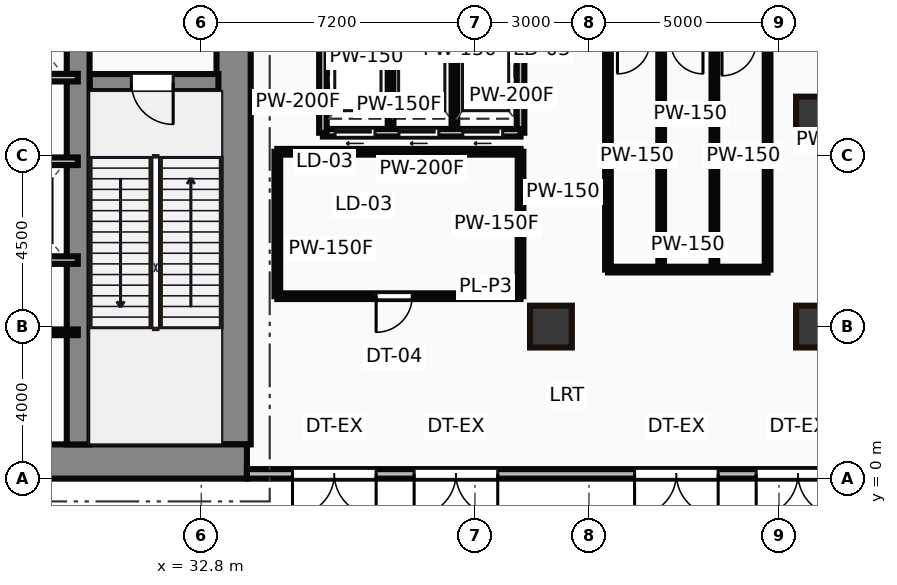
"""IFC4 building model, lengths in metres.
Left out: names, types, materials, properties, quantities, classifications, styles, units other than length and angle.
Written with IfcOpenShell. Run it as: python <this file> out.ifc"""

import sys

from ifc_helpers import new_model, si_unit, direction, frame, frame_2d, origin, origin_2d, place, context, subcontext, project, spatial, rectangle, hollow_rectangle, extrude, source, transform, mapped, element, fill, save


model = new_model("IFC4")
c1 = context("Model", 3, precision=1e-05, world=origin(), true_north=direction((0.0, 1.0)))
c2 = subcontext(c1, "Body", "Model", "MODEL_VIEW")
j1 = project(units=[si_unit("LENGTHUNIT", "METRE"), si_unit("PLANEANGLEUNIT", "RADIAN")], contexts=[c1])
p1 = place(None, origin())
s1 = spatial("IfcSite", under=j1, at=p1, CompositionType="ELEMENT")
p2 = place(p1, origin())
s2 = spatial("IfcBuilding", under=s1, at=p2, CompositionType="ELEMENT")
p3 = place(p2, origin())
s3 = spatial("IfcBuildingStorey", under=s2, at=p3, CompositionType="ELEMENT", Elevation=0.0)
m1 = source(origin(), c2, "Body", "SweptSolid", [
    extrude(rectangle(XDim=29.5, YDim=0.9, at=frame_2d((14.75, 0.0))), origin(), (0.0, 0.0, 1.0), 6.0),
])
p4 = place(p3, frame((4.5, 0.45, 0.0), z_axis=(0.0, 0.0, 1.0), x_axis=(1.0, 0.0, 0.0)))
e1 = element("IfcWall", 1, at=p4, inside=s3, PredefinedType="SHEAR", context=c2, shape_type="MappedRepresentation", body=[
    mapped(m1, transform((0.0, 0.0, 0.0))),
])
m2 = source(origin(), c2, "Body", "SweptSolid", [
    extrude(rectangle(XDim=13.1, YDim=0.9, at=frame_2d((6.55, 0.0))), origin(), (0.0, 0.0, 1.0), 6.0),
])
p5 = place(p3, frame((33.65, 0.9, 0.0), z_axis=(0.0, 0.0, 1.0), x_axis=(0.0, 1.0, 0.0)))
e2 = element("IfcWall", 2, at=p5, inside=s3, PredefinedType="SHEAR", context=c2, shape_type="MappedRepresentation", body=[
    mapped(m2, transform((0.0, 0.0, 0.0))),
])
m3 = source(origin(), c2, "Body", "SweptSolid", [
    extrude(rectangle(XDim=12.2, YDim=0.6, at=frame_2d((6.1, 0.0))), origin(), (0.0, 0.0, 1.0), 6.0),
])
p6 = place(p3, frame((29.56, 0.9, 0.0), z_axis=(0.0, 0.0, 1.0), x_axis=(0.0, 1.0, 0.0)))
e3 = element("IfcWall", 3, at=p6, inside=s3, PredefinedType="SHEAR", context=c2, shape_type="MappedRepresentation", body=[
    mapped(m3, transform((0.0, 0.0, 0.0))),
])
m4 = source(origin(), c2, "Body", "SweptSolid", [
    extrude(rectangle(XDim=3.39, YDim=0.45, at=frame_2d((1.695, 0.0))), origin(), (0.0, 0.0, 1.0), 6.0),
])
p7 = place(p3, frame((29.86, 10.42, 0.0), z_axis=(0.0, 0.0, 1.0), x_axis=(1.0, 0.0, 0.0)))
e4 = element("IfcWall", 4, at=p7, inside=s3, PredefinedType="SHEAR", context=c2, shape_type="MappedRepresentation", body=[
    mapped(m4, transform((0.0, 0.0, 0.0))),
])
p8 = place(p7, frame((1.1, 0.0, 0.0)))
e5 = element("IfcOpeningElement", 5, at=p8, cuts=e4, PredefinedType="OPENING", context=c2, shape_type="SweptSolid", body=[
    extrude(rectangle(XDim=1.1, YDim=2.15, at=frame_2d((0.55, 1.075))), frame((0.0, 0.235, 0.0), z_axis=(0.0, -1.0, 0.0), x_axis=(1.0, 0.0, 0.0)), (0.0, 0.0, 1.0), 0.47),
])
m5 = source(origin(), c2, "Body", "SweptSolid", [
    extrude(hollow_rectangle(XDim=1.1, YDim=1.1, WallThickness=0.05, at=origin_2d()), origin(), (0.0, 0.0, 1.0), 6.0),
])
for number, where, z_axis, x_axis in (
    (6, (49.0, 9.5, 0.0), (0.0, 0.0, 1.0), (1.0, 0.0, 0.0)),
    (7, (42.0, 4.0, 0.0), (0.0, 0.0, 1.0), (1.0, 0.0, 0.0)),
    (8, (49.0, 4.0, 0.0), (0.0, 0.0, 1.0), (1.0, 0.0, 0.0)),
):
    element("IfcColumn", number, at=place(p3, frame(where, z_axis=z_axis, x_axis=x_axis)), inside=s3, PredefinedType="PILASTER", context=c2, shape_type="MappedRepresentation", body=[
        mapped(m5, transform((0.0, 0.0, 0.0))),
    ])
m6 = source(origin(), c2, "Body", "SweptSolid", [
    extrude(rectangle(XDim=48.0, YDim=0.25, at=frame_2d((24.0, 0.0))), origin(), (0.0, 0.0, 1.0), 5.7),
])
p9 = place(p3, frame((34.0, 0.125, 0.0), z_axis=(0.0, 0.0, 1.0), x_axis=(1.0, 0.0, 0.0)))
e9 = element("IfcWall", 9, at=p9, inside=s3, PredefinedType="STANDARD", context=c2, shape_type="MappedRepresentation", body=[
    mapped(m6, transform((0.0, 0.0, 0.0))),
])
p10 = place(p9, frame((1.2, 0.0, 0.0)))
e10 = element("IfcOpeningElement", 10, at=p10, cuts=e9, PredefinedType="OPENING", context=c2, shape_type="SweptSolid", body=[
    extrude(rectangle(XDim=2.2, YDim=2.4, at=frame_2d((1.1, 1.2))), frame((0.0, 0.135, 0.0), z_axis=(0.0, -1.0, 0.0), x_axis=(1.0, 0.0, 0.0)), (0.0, 0.0, 1.0), 0.27),
])
p11 = place(p9, frame((4.4, 0.0, 0.0)))
e11 = element("IfcOpeningElement", 11, at=p11, cuts=e9, PredefinedType="OPENING", context=c2, shape_type="SweptSolid", body=[
    extrude(rectangle(XDim=2.2, YDim=2.4, at=frame_2d((1.1, 1.2))), frame((0.0, 0.135, 0.0), z_axis=(0.0, -1.0, 0.0), x_axis=(1.0, 0.0, 0.0)), (0.0, 0.0, 1.0), 0.27),
])
p12 = place(p9, frame((10.2, 0.0, 0.0)))
e12 = element("IfcOpeningElement", 12, at=p12, cuts=e9, PredefinedType="OPENING", context=c2, shape_type="SweptSolid", body=[
    extrude(rectangle(XDim=2.2, YDim=2.4, at=frame_2d((1.1, 1.2))), frame((0.0, 0.135, 0.0), z_axis=(0.0, -1.0, 0.0), x_axis=(1.0, 0.0, 0.0)), (0.0, 0.0, 1.0), 0.27),
])
p13 = place(p9, frame((13.4, 0.0, 0.0)))
e13 = element("IfcOpeningElement", 13, at=p13, cuts=e9, PredefinedType="OPENING", context=c2, shape_type="SweptSolid", body=[
    extrude(rectangle(XDim=2.2, YDim=2.4, at=frame_2d((1.1, 1.2))), frame((0.0, 0.135, 0.0), z_axis=(0.0, -1.0, 0.0), x_axis=(1.0, 0.0, 0.0)), (0.0, 0.0, 1.0), 0.27),
])
p14 = place(p9, frame((17.8, 0.0, 0.0)))
e14 = element("IfcOpeningElement", 14, at=p14, cuts=e9, PredefinedType="OPENING", context=c2, shape_type="SweptSolid", body=[
    extrude(rectangle(XDim=2.2, YDim=2.4, at=frame_2d((1.1, 1.2))), frame((0.0, 0.135, 0.0), z_axis=(0.0, -1.0, 0.0), x_axis=(1.0, 0.0, 0.0)), (0.0, 0.0, 1.0), 0.27),
])
p15 = place(p9, frame((21.0, 0.0, 0.0)))
e15 = element("IfcOpeningElement", 15, at=p15, cuts=e9, PredefinedType="OPENING", context=c2, shape_type="SweptSolid", body=[
    extrude(rectangle(XDim=2.2, YDim=2.4, at=frame_2d((1.1, 1.2))), frame((0.0, 0.135, 0.0), z_axis=(0.0, -1.0, 0.0), x_axis=(1.0, 0.0, 0.0)), (0.0, 0.0, 1.0), 0.27),
])
p16 = place(p9, frame((23.6, 0.0, 0.0)))
e16 = element("IfcOpeningElement", 16, at=p16, cuts=e9, PredefinedType="OPENING", context=c2, shape_type="SweptSolid", body=[
    extrude(rectangle(XDim=2.2, YDim=2.4, at=frame_2d((1.1, 1.2))), frame((0.0, 0.135, 0.0), z_axis=(0.0, -1.0, 0.0), x_axis=(1.0, 0.0, 0.0)), (0.0, 0.0, 1.0), 0.27),
])
p17 = place(p9, frame((27.9, 0.0, 0.0)))
e17 = element("IfcOpeningElement", 17, at=p17, cuts=e9, PredefinedType="OPENING", context=c2, shape_type="SweptSolid", body=[
    extrude(rectangle(XDim=2.2, YDim=2.4, at=frame_2d((1.1, 1.2))), frame((0.0, 0.135, 0.0), z_axis=(0.0, -1.0, 0.0), x_axis=(1.0, 0.0, 0.0)), (0.0, 0.0, 1.0), 0.27),
])
p18 = place(p9, frame((32.9, 0.0, 0.0)))
e18 = element("IfcOpeningElement", 18, at=p18, cuts=e9, PredefinedType="OPENING", context=c2, shape_type="SweptSolid", body=[
    extrude(rectangle(XDim=2.2, YDim=2.4, at=frame_2d((1.1, 1.2))), frame((0.0, 0.135, 0.0), z_axis=(0.0, -1.0, 0.0), x_axis=(1.0, 0.0, 0.0)), (0.0, 0.0, 1.0), 0.27),
])
p19 = place(p9, frame((37.9, 0.0, 0.0)))
e19 = element("IfcOpeningElement", 19, at=p19, cuts=e9, PredefinedType="OPENING", context=c2, shape_type="SweptSolid", body=[
    extrude(rectangle(XDim=2.2, YDim=2.4, at=frame_2d((1.1, 1.2))), frame((0.0, 0.135, 0.0), z_axis=(0.0, -1.0, 0.0), x_axis=(1.0, 0.0, 0.0)), (0.0, 0.0, 1.0), 0.27),
])
p20 = place(p9, frame((44.2, 0.0, 0.0)))
e20 = element("IfcOpeningElement", 20, at=p20, cuts=e9, PredefinedType="OPENING", context=c2, shape_type="SweptSolid", body=[
    extrude(rectangle(XDim=2.2, YDim=2.4, at=frame_2d((1.1, 1.2))), frame((0.0, 0.135, 0.0), z_axis=(0.0, -1.0, 0.0), x_axis=(1.0, 0.0, 0.0)), (0.0, 0.0, 1.0), 0.27),
])
p21 = place(p9, frame((40.6, 0.0, 0.9)))
e21 = element("IfcOpeningElement", 21, at=p21, cuts=e9, PredefinedType="OPENING", context=c2, shape_type="SweptSolid", body=[
    extrude(rectangle(XDim=3.0, YDim=2.4, at=frame_2d((1.5, 1.2))), frame((0.0, 0.135, 0.0), z_axis=(0.0, -1.0, 0.0), x_axis=(1.0, 0.0, 0.0)), (0.0, 0.0, 1.0), 0.27),
])
m7 = source(origin(), c2, "Body", "SweptSolid", [
    extrude(rectangle(XDim=8.8, YDim=0.2, at=frame_2d((4.4, 0.0))), origin(), (0.0, 0.0, 1.0), 5.7),
])
p22 = place(p3, frame((20.75, 10.55, 0.0), z_axis=(0.0, 0.0, 1.0), x_axis=(1.0, 0.0, 0.0)))
e22 = element("IfcWall", 22, at=p22, inside=s3, PredefinedType="PARTITIONING", context=c2, shape_type="MappedRepresentation", body=[
    mapped(m7, transform((0.0, 0.0, 0.0))),
])
p23 = place(p22, frame((0.5, 0.0, 0.0)))
e23 = element("IfcOpeningElement", 23, at=p23, cuts=e22, PredefinedType="OPENING", context=c2, shape_type="SweptSolid", body=[
    extrude(rectangle(XDim=1.05, YDim=2.15, at=frame_2d((0.525, 1.075))), frame((0.0, 0.11, 0.0), z_axis=(0.0, -1.0, 0.0), x_axis=(1.0, 0.0, 0.0)), (0.0, 0.0, 1.0), 0.22),
])
p24 = place(p22, frame((2.6, 0.0, 0.0)))
e24 = element("IfcOpeningElement", 24, at=p24, cuts=e22, PredefinedType="OPENING", context=c2, shape_type="SweptSolid", body=[
    extrude(rectangle(XDim=1.05, YDim=2.15, at=frame_2d((0.525, 1.075))), frame((0.0, 0.11, 0.0), z_axis=(0.0, -1.0, 0.0), x_axis=(1.0, 0.0, 0.0)), (0.0, 0.0, 1.0), 0.22),
])
p25 = place(p22, frame((4.7, 0.0, 0.0)))
e25 = element("IfcOpeningElement", 25, at=p25, cuts=e22, PredefinedType="OPENING", context=c2, shape_type="SweptSolid", body=[
    extrude(rectangle(XDim=1.05, YDim=2.15, at=frame_2d((0.525, 1.075))), frame((0.0, 0.11, 0.0), z_axis=(0.0, -1.0, 0.0), x_axis=(1.0, 0.0, 0.0)), (0.0, 0.0, 1.0), 0.22),
])
p26 = place(p22, frame((6.8, 0.0, 0.0)))
e26 = element("IfcOpeningElement", 26, at=p26, cuts=e22, PredefinedType="OPENING", context=c2, shape_type="SweptSolid", body=[
    extrude(rectangle(XDim=1.05, YDim=2.15, at=frame_2d((0.525, 1.075))), frame((0.0, 0.11, 0.0), z_axis=(0.0, -1.0, 0.0), x_axis=(1.0, 0.0, 0.0)), (0.0, 0.0, 1.0), 0.22),
])
m8 = source(origin(), c2, "Body", "SweptSolid", [
    extrude(rectangle(XDim=4.55, YDim=0.2, at=frame_2d((2.275, 0.0))), origin(), (0.0, 0.0, 1.0), 5.7),
])
p27 = place(p3, frame((25.0, 8.35, 0.0), z_axis=(0.0, 0.0, 1.0), x_axis=(1.0, 0.0, 0.0)))
e27 = element("IfcWall", 27, at=p27, inside=s3, PredefinedType="PARTITIONING", context=c2, shape_type="MappedRepresentation", body=[
    mapped(m8, transform((0.0, 0.0, 0.0))),
])
p28 = place(p27, frame((0.5, 0.0, 0.0)))
e28 = element("IfcOpeningElement", 28, at=p28, cuts=e27, PredefinedType="OPENING", context=c2, shape_type="SweptSolid", body=[
    extrude(rectangle(XDim=1.05, YDim=2.15, at=frame_2d((0.525, 1.075))), frame((0.0, 0.11, 0.0), z_axis=(0.0, -1.0, 0.0), x_axis=(1.0, 0.0, 0.0)), (0.0, 0.0, 1.0), 0.22),
])
p29 = place(p27, frame((2.6, 0.0, 0.0)))
e29 = element("IfcOpeningElement", 29, at=p29, cuts=e27, PredefinedType="OPENING", context=c2, shape_type="SweptSolid", body=[
    extrude(rectangle(XDim=1.05, YDim=2.15, at=frame_2d((0.525, 1.075))), frame((0.0, 0.11, 0.0), z_axis=(0.0, -1.0, 0.0), x_axis=(1.0, 0.0, 0.0)), (0.0, 0.0, 1.0), 0.22),
])
p30 = place(p3, frame((25.0, 5.75, 0.0), z_axis=(0.0, 0.0, 1.0), x_axis=(1.0, 0.0, 0.0)))
e30 = element("IfcWall", 30, at=p30, inside=s3, PredefinedType="PARTITIONING", context=c2, shape_type="MappedRepresentation", body=[
    mapped(m8, transform((0.0, 0.0, 0.0))),
])
m9 = source(origin(), c2, "Body", "SweptSolid", [
    extrude(rectangle(XDim=4.55, YDim=0.15, at=frame_2d((2.275, 0.0))), origin(), (0.0, 0.0, 1.0), 5.7),
])
p31 = place(p3, frame((25.0, 3.85, 0.0), z_axis=(0.0, 0.0, 1.0), x_axis=(1.0, 0.0, 0.0)))
e31 = element("IfcWall", 31, at=p31, inside=s3, PredefinedType="PARTITIONING", context=c2, shape_type="MappedRepresentation", body=[
    mapped(m9, transform((0.0, 0.0, 0.0))),
])
m10 = source(origin(), c2, "Body", "SweptSolid", [
    extrude(rectangle(XDim=5.2, YDim=0.2, at=frame_2d((2.6, 0.0))), origin(), (0.0, 0.0, 1.0), 5.7),
])
p32 = place(p3, frame((36.0, 9.1, 0.0), z_axis=(0.0, 0.0, 1.0), x_axis=(1.0, 0.0, 0.0)))
e32 = element("IfcWall", 32, at=p32, inside=s3, PredefinedType="PARTITIONING", context=c2, shape_type="MappedRepresentation", body=[
    mapped(m10, transform((0.0, 0.0, 0.0))),
])
p33 = place(p32, frame((0.32, 0.0, 0.0)))
e33 = element("IfcOpeningElement", 33, at=p33, cuts=e32, PredefinedType="OPENING", context=c2, shape_type="SweptSolid", body=[
    extrude(rectangle(XDim=1.05, YDim=2.15, at=frame_2d((0.525, 1.075))), frame((0.0, 0.11, 0.0), z_axis=(0.0, -1.0, 0.0), x_axis=(1.0, 0.0, 0.0)), (0.0, 0.0, 1.0), 0.22),
])
p34 = place(p32, frame((2.0, 0.0, 0.0)))
e34 = element("IfcOpeningElement", 34, at=p34, cuts=e32, PredefinedType="OPENING", context=c2, shape_type="SweptSolid", body=[
    extrude(rectangle(XDim=1.05, YDim=2.15, at=frame_2d((0.525, 1.075))), frame((0.0, 0.11, 0.0), z_axis=(0.0, -1.0, 0.0), x_axis=(1.0, 0.0, 0.0)), (0.0, 0.0, 1.0), 0.22),
])
p35 = place(p32, frame((3.68, 0.0, 0.0)))
e35 = element("IfcOpeningElement", 35, at=p35, cuts=e32, PredefinedType="OPENING", context=c2, shape_type="SweptSolid", body=[
    extrude(rectangle(XDim=1.05, YDim=2.15, at=frame_2d((0.525, 1.075))), frame((0.0, 0.11, 0.0), z_axis=(0.0, -1.0, 0.0), x_axis=(1.0, 0.0, 0.0)), (0.0, 0.0, 1.0), 0.22),
])
m11 = source(origin(), c2, "Body", "SweptSolid", [
    extrude(rectangle(XDim=2.8, YDim=0.2, at=frame_2d((1.4, 0.0))), origin(), (0.0, 0.0, 1.0), 5.7),
])
for number, where, z_axis, x_axis in (
    (36, (36.0, 9.1, 0.0), (0.0, 0.0, 1.0), (0.0, 1.0, 0.0)),
    (37, (41.2, 9.1, 0.0), (0.0, 0.0, 1.0), (0.0, 1.0, 0.0)),
):
    element("IfcWall", number, at=place(p3, frame(where, z_axis=z_axis, x_axis=x_axis)), inside=s3, PredefinedType="PARTITIONING", context=c2, shape_type="MappedRepresentation", body=[
        mapped(m11, transform((0.0, 0.0, 0.0))),
    ])
m12 = source(origin(), c2, "Body", "SweptSolid", [
    extrude(rectangle(XDim=2.7, YDim=0.15, at=frame_2d((1.35, 0.0))), origin(), (0.0, 0.0, 1.0), 5.7),
])
for number, where, z_axis, x_axis in (
    (38, (37.78, 9.15, 0.0), (0.0, 0.0, 1.0), (0.0, 1.0, 0.0)),
    (39, (39.46, 9.15, 0.0), (0.0, 0.0, 1.0), (0.0, 1.0, 0.0)),
):
    element("IfcWall", number, at=place(p3, frame(where, z_axis=z_axis, x_axis=x_axis)), inside=s3, PredefinedType="PARTITIONING", context=c2, shape_type="MappedRepresentation", body=[
        mapped(m12, transform((0.0, 0.0, 0.0))),
    ])
m13 = source(origin(), c2, "Body", "SweptSolid", [
    extrude(rectangle(XDim=4.2, YDim=0.15, at=frame_2d((2.1, 0.0))), origin(), (0.0, 0.0, 1.0), 5.7),
])
p36 = place(p3, frame((43.5, 5.5, 0.0), z_axis=(0.0, 0.0, 1.0), x_axis=(1.0, 0.0, 0.0)))
e40 = element("IfcWall", 40, at=p36, inside=s3, PredefinedType="PARTITIONING", context=c2, shape_type="MappedRepresentation", body=[
    mapped(m13, transform((0.0, 0.0, 0.0))),
])
m14 = source(origin(), c2, "Body", "SweptSolid", [
    extrude(rectangle(XDim=6.0, YDim=0.15, at=frame_2d((3.0, 0.0))), origin(), (0.0, 0.0, 1.0), 5.7),
])
for number, where, z_axis, x_axis in (
    (41, (43.5, 5.5, 0.0), (0.0, 0.0, 1.0), (0.0, 1.0, 0.0)),
    (42, (47.7, 5.5, 0.0), (0.0, 0.0, 1.0), (0.0, 1.0, 0.0)),
    (43, (44.9, 5.5, 0.0), (0.0, 0.0, 1.0), (0.0, 1.0, 0.0)),
    (44, (46.3, 5.5, 0.0), (0.0, 0.0, 1.0), (0.0, 1.0, 0.0)),
):
    element("IfcWall", number, at=place(p3, frame(where, z_axis=z_axis, x_axis=x_axis)), inside=s3, PredefinedType="PARTITIONING", context=c2, shape_type="MappedRepresentation", body=[
        mapped(m14, transform((0.0, 0.0, 0.0))),
    ])
m15 = source(origin(), c2, "Body", "SweptSolid", [
    extrude(rectangle(XDim=6.4, YDim=0.15, at=frame_2d((3.2, 0.0))), origin(), (0.0, 0.0, 1.0), 5.7),
])
p37 = place(p3, frame((34.8, 4.8, 0.0), z_axis=(0.0, 0.0, 1.0), x_axis=(1.0, 0.0, 0.0)))
e45 = element("IfcWall", 45, at=p37, inside=s3, PredefinedType="PARTITIONING", context=c2, shape_type="MappedRepresentation", body=[
    mapped(m15, transform((0.0, 0.0, 0.0))),
])
p38 = place(p37, frame((2.6, 0.0, 0.0)))
e46 = element("IfcOpeningElement", 46, at=p38, cuts=e45, PredefinedType="OPENING", context=c2, shape_type="SweptSolid", body=[
    extrude(rectangle(XDim=0.95, YDim=2.15, at=frame_2d((0.475, 1.075))), frame((0.0, 0.085, 0.0), z_axis=(0.0, -1.0, 0.0), x_axis=(1.0, 0.0, 0.0)), (0.0, 0.0, 1.0), 0.17),
])
p39 = place(p3, frame((34.8, 8.6, 0.0), z_axis=(0.0, 0.0, 1.0), x_axis=(1.0, 0.0, 0.0)))
e47 = element("IfcWall", 47, at=p39, inside=s3, PredefinedType="PARTITIONING", context=c2, shape_type="MappedRepresentation", body=[
    mapped(m15, transform((0.0, 0.0, 0.0))),
])
m16 = source(origin(), c2, "Body", "SweptSolid", [
    extrude(rectangle(XDim=3.8, YDim=0.15, at=frame_2d((1.9, 0.0))), origin(), (0.0, 0.0, 1.0), 5.7),
])
for number, where, z_axis, x_axis in (
    (48, (34.8, 4.8, 0.0), (0.0, 0.0, 1.0), (0.0, 1.0, 0.0)),
    (49, (41.2, 4.8, 0.0), (0.0, 0.0, 1.0), (0.0, 1.0, 0.0)),
):
    element("IfcWall", number, at=place(p3, frame(where, z_axis=z_axis, x_axis=x_axis)), inside=s3, PredefinedType="PARTITIONING", context=c2, shape_type="MappedRepresentation", body=[
        mapped(m16, transform((0.0, 0.0, 0.0))),
    ])
m17 = source(origin(), c2, "Body", "SweptSolid", [
    extrude(rectangle(XDim=2.2, YDim=2.4, at=frame_2d((1.1, 1.2))), frame((0.0, 0.025, 0.0), z_axis=(0.0, -1.0, 0.0), x_axis=(1.0, 0.0, 0.0)), (0.0, 0.0, 1.0), 0.05),
])
p40 = place(p10, frame((2.2, 0.0, 0.0), z_axis=(0.0, 0.0, 1.0), x_axis=(-1.0, 0.0, 0.0)))
e50 = element("IfcDoor", 50, at=p40, inside=s3, OperationType="DOUBLE_DOOR_SINGLE_SWING", PredefinedType="DOOR", context=c2, shape_type="MappedRepresentation", body=[
    mapped(m17, transform((0.0, 0.0, 0.0))),
])
fill(e10, e50)
p41 = place(p11, frame((2.2, 0.0, 0.0), z_axis=(0.0, 0.0, 1.0), x_axis=(-1.0, 0.0, 0.0)))
e51 = element("IfcDoor", 51, at=p41, inside=s3, OperationType="DOUBLE_DOOR_SINGLE_SWING", PredefinedType="DOOR", context=c2, shape_type="MappedRepresentation", body=[
    mapped(m17, transform((0.0, 0.0, 0.0))),
])
fill(e11, e51)
p42 = place(p12, frame((2.2, 0.0, 0.0), z_axis=(0.0, 0.0, 1.0), x_axis=(-1.0, 0.0, 0.0)))
e52 = element("IfcDoor", 52, at=p42, inside=s3, OperationType="DOUBLE_DOOR_SINGLE_SWING", PredefinedType="DOOR", context=c2, shape_type="MappedRepresentation", body=[
    mapped(m17, transform((0.0, 0.0, 0.0))),
])
fill(e12, e52)
p43 = place(p13, frame((2.2, 0.0, 0.0), z_axis=(0.0, 0.0, 1.0), x_axis=(-1.0, 0.0, 0.0)))
e53 = element("IfcDoor", 53, at=p43, inside=s3, OperationType="DOUBLE_DOOR_SINGLE_SWING", PredefinedType="DOOR", context=c2, shape_type="MappedRepresentation", body=[
    mapped(m17, transform((0.0, 0.0, 0.0))),
])
fill(e13, e53)
m18 = source(origin(), c2, "Body", "SweptSolid", [
    extrude(rectangle(XDim=1.1, YDim=2.15, at=frame_2d((0.55, 1.075))), frame((0.0, 0.025, 0.0), z_axis=(0.0, -1.0, 0.0), x_axis=(1.0, 0.0, 0.0)), (0.0, 0.0, 1.0), 0.05),
])
p44 = place(p8, frame((1.1, 0.0, 0.0), z_axis=(0.0, 0.0, 1.0), x_axis=(-1.0, 0.0, 0.0)))
e54 = element("IfcDoor", 54, at=p44, inside=s3, OperationType="SINGLE_SWING_RIGHT", PredefinedType="DOOR", context=c2, shape_type="MappedRepresentation", body=[
    mapped(m18, transform((0.0, 0.0, 0.0))),
])
fill(e5, e54)
m19 = source(origin(), c2, "Body", "SweptSolid", [
    extrude(rectangle(XDim=1.05, YDim=2.15, at=frame_2d((0.525, 1.075))), frame((0.0, 0.025, 0.0), z_axis=(0.0, -1.0, 0.0), x_axis=(1.0, 0.0, 0.0)), (0.0, 0.0, 1.0), 0.05),
])
p45 = place(p33, frame((1.05, 0.0, 0.0), z_axis=(0.0, 0.0, 1.0), x_axis=(-1.0, 0.0, 0.0)))
e55 = element("IfcDoor", 55, at=p45, inside=s3, OperationType="SLIDING_TO_LEFT", PredefinedType="DOOR", context=c2, shape_type="MappedRepresentation", body=[
    mapped(m19, transform((0.0, 0.0, 0.0))),
])
fill(e33, e55)
p46 = place(p34, frame((1.05, 0.0, 0.0), z_axis=(0.0, 0.0, 1.0), x_axis=(-1.0, 0.0, 0.0)))
e56 = element("IfcDoor", 56, at=p46, inside=s3, OperationType="SLIDING_TO_LEFT", PredefinedType="DOOR", context=c2, shape_type="MappedRepresentation", body=[
    mapped(m19, transform((0.0, 0.0, 0.0))),
])
fill(e34, e56)
p47 = place(p35, frame((1.05, 0.0, 0.0), z_axis=(0.0, 0.0, 1.0), x_axis=(-1.0, 0.0, 0.0)))
e57 = element("IfcDoor", 57, at=p47, inside=s3, OperationType="SLIDING_TO_LEFT", PredefinedType="DOOR", context=c2, shape_type="MappedRepresentation", body=[
    mapped(m19, transform((0.0, 0.0, 0.0))),
])
fill(e35, e57)
m20 = source(origin(), c2, "Body", "SweptSolid", [
    extrude(rectangle(XDim=0.95, YDim=2.15, at=frame_2d((0.475, 1.075))), frame((0.0, 0.025, 0.0), z_axis=(0.0, -1.0, 0.0), x_axis=(1.0, 0.0, 0.0)), (0.0, 0.0, 1.0), 0.05),
])
p48 = place(p38, frame((0.95, 0.0, 0.0), z_axis=(0.0, 0.0, 1.0), x_axis=(-1.0, 0.0, 0.0)))
e58 = element("IfcDoor", 58, at=p48, inside=s3, OperationType="SINGLE_SWING_LEFT", PredefinedType="DOOR", context=c2, shape_type="MappedRepresentation", body=[
    mapped(m20, transform((0.0, 0.0, 0.0))),
])
fill(e46, e58)
save(model, sys.argv[1])
